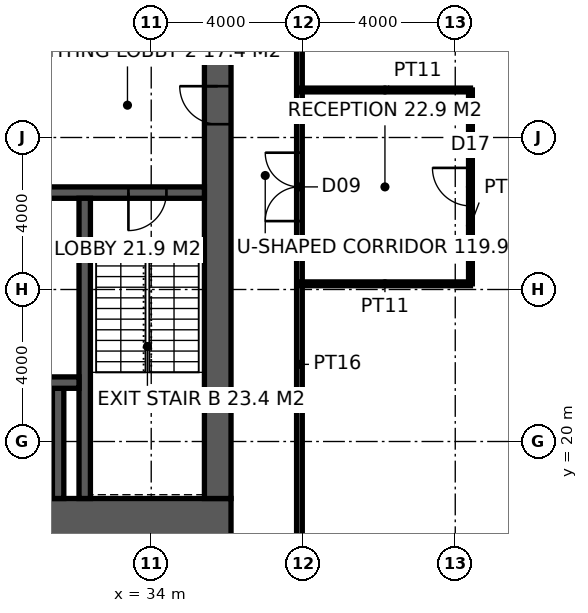
"""IFC4 building model, lengths in metres.
Left out: names, types, materials, properties, quantities, classifications, styles, units other than length and angle.
Written with IfcOpenShell. Run it as: python <this file> out.ifc"""

import sys

from ifc_helpers import new_model, si_unit, direction, frame, frame_2d, origin, place, context, subcontext, project, spatial, rectangle, extrude, element, fill, save


model = new_model("IFC4")
c1 = context("Model", 3, precision=1e-05, world=origin(), true_north=direction((0.0, 1.0)))
c2 = subcontext(c1, "Body", "Model", "MODEL_VIEW")
j1 = project(units=[si_unit("LENGTHUNIT", "METRE"), si_unit("PLANEANGLEUNIT", "RADIAN")], contexts=[c1])
p1 = place(None, origin())
s1 = spatial("IfcSite", under=j1, at=p1, CompositionType="ELEMENT")
p2 = place(p1, origin())
s2 = spatial("IfcBuilding", under=s1, at=p2, CompositionType="ELEMENT")
p3 = place(p2, frame((0.0, 0.0, 167.8)))
s3 = spatial("IfcBuildingStorey", under=s2, at=p3, CompositionType="ELEMENT", Elevation=167.8)
p4 = place(p3, frame((18.5, 18.0, -0.15), z_axis=(0.0, 0.0, 1.0), x_axis=(1.0, 0.0, 0.0)))
e1 = element("IfcWall", 1, at=p4, inside=s3, PredefinedType="SHEAR", context=c2, shape_type="SweptSolid", body=[
    extrude(rectangle(XDim=17.6, YDim=1.0, at=frame_2d((8.8, 0.0))), origin(), (0.0, 0.0, 1.0), 4.0),
])
p5 = place(p4, frame((3.45, 0.0, 0.15)))
e2 = element("IfcOpeningElement", 2, at=p5, cuts=e1, PredefinedType="OPENING", context=c2, shape_type="SweptSolid", body=[
    extrude(rectangle(XDim=1.5, YDim=2.4, at=frame_2d((0.75, 1.2))), frame((0.0, 0.51, 0.0), z_axis=(0.0, -1.0, 0.0), x_axis=(1.0, 0.0, 0.0)), (0.0, 0.0, 1.0), 1.02),
])
p6 = place(p3, frame((35.75, 18.5, -0.15), z_axis=(0.0, 0.0, 1.0), x_axis=(0.0, 1.0, 0.0)))
e3 = element("IfcWall", 3, at=p6, inside=s3, PredefinedType="SHEAR", context=c2, shape_type="SweptSolid", body=[
    extrude(rectangle(XDim=17.0, YDim=0.7, at=frame_2d((8.5, 0.0))), origin(), (0.0, 0.0, 1.0), 4.0),
])
p7 = place(p6, frame((9.85, 0.0, 0.15)))
e4 = element("IfcOpeningElement", 4, at=p7, cuts=e3, PredefinedType="OPENING", context=c2, shape_type="SweptSolid", body=[
    extrude(rectangle(XDim=1.0, YDim=2.2, at=frame_2d((0.5, 1.1))), frame((0.0, 0.36, 0.0), z_axis=(0.0, -1.0, 0.0), x_axis=(1.0, 0.0, 0.0)), (0.0, 0.0, 1.0), 0.72),
])
p8 = place(p3, frame((24.15, 26.55, -0.15), z_axis=(0.0, 0.0, 1.0), x_axis=(1.0, 0.0, 0.0)))
e5 = element("IfcWall", 5, at=p8, inside=s3, PredefinedType="SHEAR", context=c2, shape_type="SweptSolid", body=[
    extrude(rectangle(XDim=11.25, YDim=0.3, at=frame_2d((5.625, 0.0))), origin(), (0.0, 0.0, 1.0), 4.0),
])
p9 = place(p8, frame((9.25, 0.0, 0.15)))
e6 = element("IfcOpeningElement", 6, at=p9, cuts=e5, PredefinedType="OPENING", context=c2, shape_type="SweptSolid", body=[
    extrude(rectangle(XDim=1.0, YDim=2.2, at=frame_2d((0.5, 1.1))), frame((0.0, 0.16, 0.0), z_axis=(0.0, -1.0, 0.0), x_axis=(1.0, 0.0, 0.0)), (0.0, 0.0, 1.0), 0.32),
])
p10 = place(p8, frame((4.9, 0.0, 0.15)))
e7 = element("IfcOpeningElement", 7, at=p10, cuts=e5, PredefinedType="OPENING", context=c2, shape_type="SweptSolid", body=[
    extrude(rectangle(XDim=1.5, YDim=2.4, at=frame_2d((0.75, 1.2))), frame((0.0, 0.16, 0.0), z_axis=(0.0, -1.0, 0.0), x_axis=(1.0, 0.0, 0.0)), (0.0, 0.0, 1.0), 0.32),
])
p11 = place(p3, frame((32.25, 18.5, -0.15), z_axis=(0.0, 0.0, 1.0), x_axis=(0.0, 1.0, 0.0)))
e8 = element("IfcWall", 8, at=p11, inside=s3, PredefinedType="SHEAR", context=c2, shape_type="SweptSolid", body=[
    extrude(rectangle(XDim=7.9, YDim=0.3, at=frame_2d((3.95, 0.0))), origin(), (0.0, 0.0, 1.0), 4.0),
])
p12 = place(p3, frame((31.55, 18.5, -0.15), z_axis=(0.0, 0.0, 1.0), x_axis=(0.0, 1.0, 0.0)))
e9 = element("IfcWall", 9, at=p12, inside=s3, PredefinedType="SHEAR", context=c2, shape_type="SweptSolid", body=[
    extrude(rectangle(XDim=2.9, YDim=0.3, at=frame_2d((1.45, 0.0))), origin(), (0.0, 0.0, 1.0), 4.0),
])
p13 = place(p3, frame((28.3, 21.55, -0.15), z_axis=(0.0, 0.0, 1.0), x_axis=(1.0, 0.0, 0.0)))
e10 = element("IfcWall", 10, at=p13, inside=s3, PredefinedType="SHEAR", context=c2, shape_type="SweptSolid", body=[
    extrude(rectangle(XDim=3.8, YDim=0.3, at=frame_2d((1.9, 0.0))), origin(), (0.0, 0.0, 1.0), 4.0),
])
p14 = place(p13, frame((1.05, 0.0, 0.15)))
e11 = element("IfcOpeningElement", 11, at=p14, cuts=e10, PredefinedType="OPENING", context=c2, shape_type="SweptSolid", body=[
    extrude(rectangle(XDim=1.3, YDim=2.4, at=frame_2d((0.65, 1.2))), frame((0.0, 0.16, 0.0), z_axis=(0.0, -1.0, 0.0), x_axis=(1.0, 0.0, 0.0)), (0.0, 0.0, 1.0), 0.32),
])
p15 = place(p3, frame((37.9, 15.025, 0.0), z_axis=(0.0, 0.0, 1.0), x_axis=(0.0, 1.0, 0.0)))
e12 = element("IfcWall", 12, at=p15, inside=s3, PredefinedType="PARTITIONING", context=c2, shape_type="SweptSolid", body=[
    extrude(rectangle(XDim=23.35, YDim=0.15, at=frame_2d((11.675, 0.0))), origin(), (0.0, 0.0, 1.0), 2.65),
])
p16 = place(p15, frame((10.775, 0.0, 0.0)))
e13 = element("IfcOpeningElement", 13, at=p16, cuts=e12, PredefinedType="OPENING", context=c2, shape_type="SweptSolid", body=[
    extrude(rectangle(XDim=1.8, YDim=2.4, at=frame_2d((0.9, 1.2))), frame((0.0, 0.085, 0.0), z_axis=(0.0, -1.0, 0.0), x_axis=(1.0, 0.0, 0.0)), (0.0, 0.0, 1.0), 0.17),
])
p17 = place(p3, frame((37.9, 24.15, 0.0), z_axis=(0.0, 0.0, 1.0), x_axis=(1.0, 0.0, 0.0)))
e14 = element("IfcWall", 14, at=p17, inside=s3, PredefinedType="PARTITIONING", context=c2, shape_type="SweptSolid", body=[
    extrude(rectangle(XDim=4.5, YDim=0.1, at=frame_2d((2.25, 0.0))), origin(), (0.0, 0.0, 1.0), 2.65),
])
p18 = place(p3, frame((42.4, 24.15, 0.0), z_axis=(0.0, 0.0, 1.0), x_axis=(0.0, 1.0, 0.0)))
e15 = element("IfcWall", 15, at=p18, inside=s3, PredefinedType="PARTITIONING", context=c2, shape_type="SweptSolid", body=[
    extrude(rectangle(XDim=5.1, YDim=0.1, at=frame_2d((2.55, 0.0))), origin(), (0.0, 0.0, 1.0), 3.85),
])
p19 = place(p18, frame((2.05, 0.0, 0.0)))
e16 = element("IfcOpeningElement", 16, at=p19, cuts=e15, PredefinedType="OPENING", context=c2, shape_type="SweptSolid", body=[
    extrude(rectangle(XDim=1.0, YDim=2.2, at=frame_2d((0.5, 1.1))), frame((0.0, 0.06, 0.0), z_axis=(0.0, -1.0, 0.0), x_axis=(1.0, 0.0, 0.0)), (0.0, 0.0, 1.0), 0.12),
])
p20 = place(p3, frame((42.4, 29.25, 0.0), z_axis=(0.0, 0.0, 1.0), x_axis=(-1.0, 0.0, 0.0)))
e17 = element("IfcWall", 17, at=p20, inside=s3, PredefinedType="PARTITIONING", context=c2, shape_type="SweptSolid", body=[
    extrude(rectangle(XDim=4.5, YDim=0.1, at=frame_2d((2.25, 0.0))), origin(), (0.0, 0.0, 1.0), 3.85),
])
p21 = place(p9, frame((1.0, 0.0, 0.0), z_axis=(0.0, 0.0, 1.0), x_axis=(-1.0, 0.0, 0.0)))
e18 = element("IfcDoor", 18, at=p21, inside=s3, OperationType="SINGLE_SWING_RIGHT", PredefinedType="DOOR", context=c2, shape_type="SweptSolid", body=[
    extrude(rectangle(XDim=1.0, YDim=2.2, at=frame_2d((0.5, 1.1))), frame((0.0, 0.025, 0.0), z_axis=(0.0, -1.0, 0.0), x_axis=(1.0, 0.0, 0.0)), (0.0, 0.0, 1.0), 0.05),
])
fill(e6, e18)
p22 = place(p7, origin())
e19 = element("IfcDoor", 19, at=p22, inside=s3, OperationType="SINGLE_SWING_RIGHT", PredefinedType="DOOR", context=c2, shape_type="SweptSolid", body=[
    extrude(rectangle(XDim=1.0, YDim=2.2, at=frame_2d((0.5, 1.1))), frame((0.0, 0.025, 0.0), z_axis=(0.0, -1.0, 0.0), x_axis=(1.0, 0.0, 0.0)), (0.0, 0.0, 1.0), 0.05),
])
fill(e4, e19)
p23 = place(p16, origin())
e20 = element("IfcDoor", 20, at=p23, inside=s3, OperationType="DOUBLE_DOOR_DOUBLE_SWING", PredefinedType="DOOR", context=c2, shape_type="SweptSolid", body=[
    extrude(rectangle(XDim=1.8, YDim=2.4, at=frame_2d((0.9, 1.2))), frame((0.0, 0.025, 0.0), z_axis=(0.0, -1.0, 0.0), x_axis=(1.0, 0.0, 0.0)), (0.0, 0.0, 1.0), 0.05),
])
fill(e13, e20)
p24 = place(p19, origin())
e21 = element("IfcDoor", 21, at=p24, inside=s3, OperationType="SINGLE_SWING_RIGHT", PredefinedType="DOOR", context=c2, shape_type="SweptSolid", body=[
    extrude(rectangle(XDim=1.0, YDim=2.2, at=frame_2d((0.5, 1.1))), frame((0.0, 0.025, 0.0), z_axis=(0.0, -1.0, 0.0), x_axis=(1.0, 0.0, 0.0)), (0.0, 0.0, 1.0), 0.05),
])
fill(e16, e21)
save(model, sys.argv[1])
